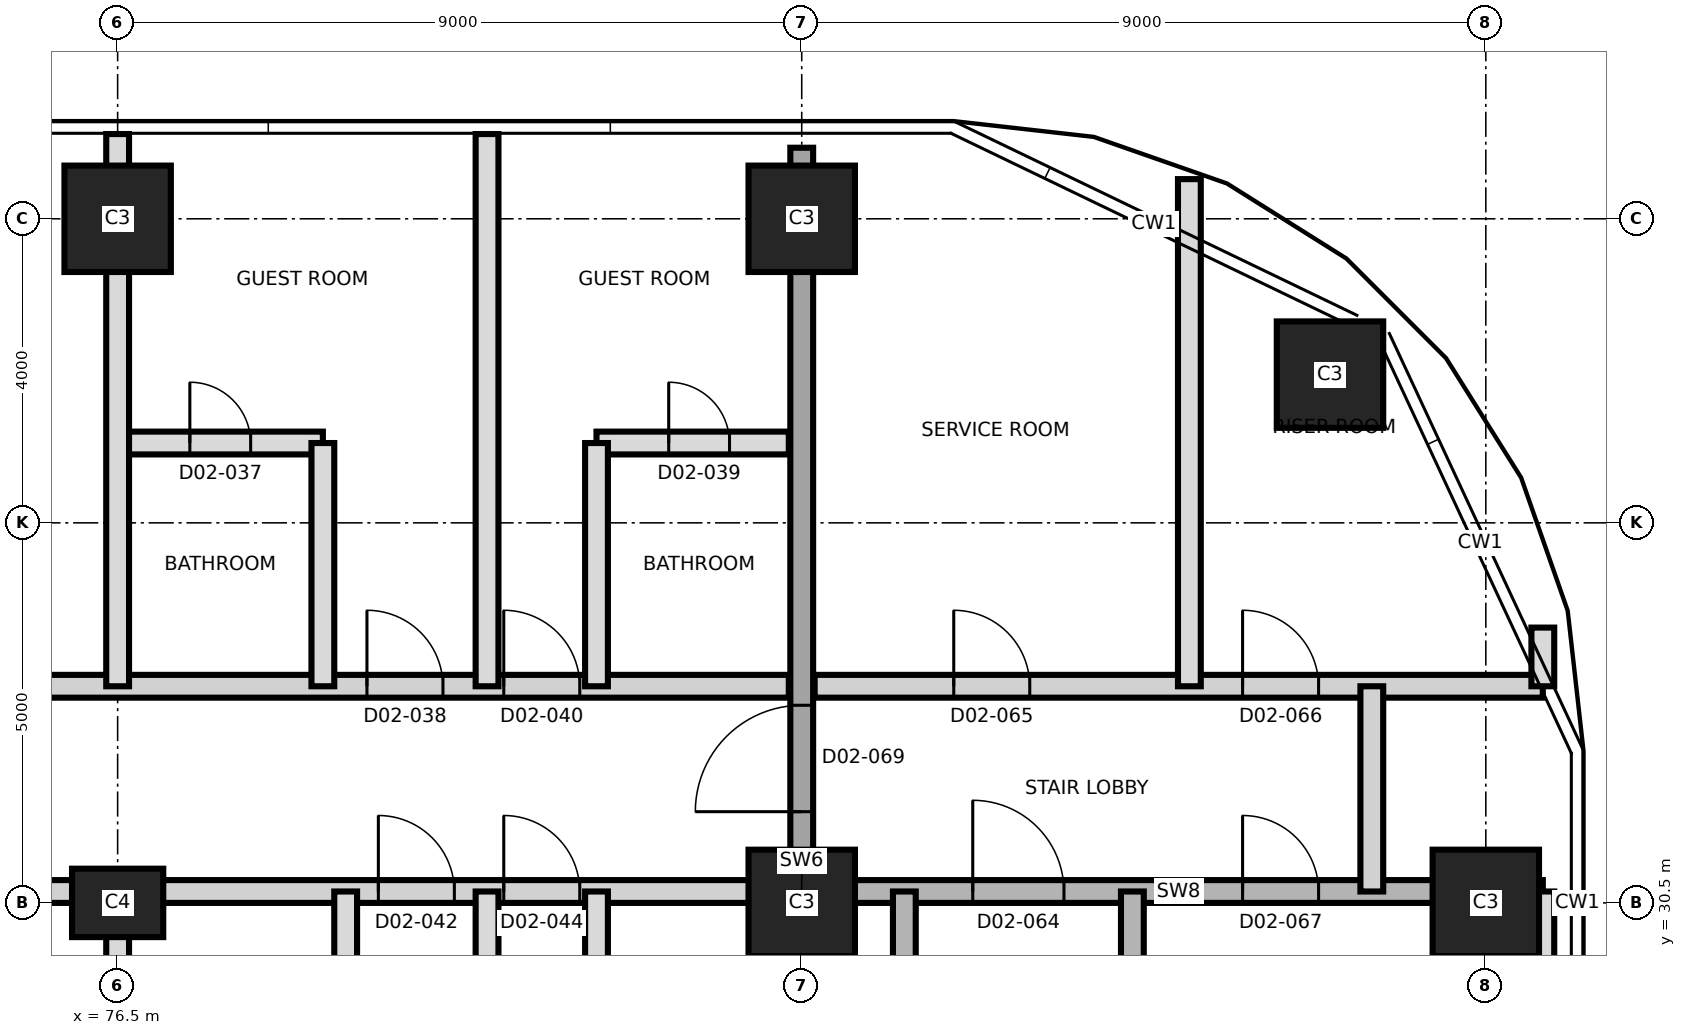
"""IFC4 building model, lengths in metres.
Left out: names, types, materials, properties, quantities, classifications, styles, units other than length and angle.
Written with IfcOpenShell. Run it as: python <this file> out.ifc"""

import sys

from ifc_helpers import new_model, si_unit, direction, frame, frame_2d, origin, origin_2d, place, context, subcontext, project, spatial, rectangle, extrude, element, fill, save


model = new_model("IFC4")
c1 = context("Model", 3, precision=1e-05, world=origin(), true_north=direction((0.0, 1.0)))
c2 = subcontext(c1, "Body", "Model", "MODEL_VIEW")
j1 = project(units=[si_unit("LENGTHUNIT", "METRE"), si_unit("PLANEANGLEUNIT", "RADIAN")], contexts=[c1])
p1 = place(None, origin())
s1 = spatial("IfcSite", under=j1, at=p1, CompositionType="ELEMENT")
p2 = place(p1, origin())
s2 = spatial("IfcBuilding", under=s1, at=p2, CompositionType="ELEMENT")
p3 = place(p2, frame((0.0, 0.0, 44.6)))
s3 = spatial("IfcBuildingStorey", under=s2, at=p3, CompositionType="ELEMENT", Elevation=44.6)
p4 = place(p3, frame((76.5, 30.5, 0.0), z_axis=(0.0, 0.0, 1.0), x_axis=(1.0, 0.0, 0.0)))
e1 = element("IfcColumn", 1, at=p4, inside=s3, PredefinedType="COLUMN", context=c2, shape_type="SweptSolid", body=[
    extrude(rectangle(XDim=1.2, YDim=0.9, at=origin_2d()), origin(), (0.0, 0.0, 1.0), 3.7),
])
for number, where, z_axis, x_axis in (
    (2, (85.5, 30.5, 0.0), (0.0, 0.0, 1.0), (1.0, 0.0, 0.0)),
    (3, (94.5, 30.5, 0.0), (0.0, 0.0, 1.0), (1.0, 0.0, 0.0)),
    (4, (92.45, 37.45, 0.0), (0.0, 0.0, 1.0), (1.0, 0.0, 0.0)),
    (5, (76.5, 39.5, 0.0), (0.0, 0.0, 1.0), (1.0, 0.0, 0.0)),
    (6, (85.5, 39.5, 0.0), (0.0, 0.0, 1.0), (1.0, 0.0, 0.0)),
):
    element("IfcColumn", number, at=place(p3, frame(where, z_axis=z_axis, x_axis=x_axis)), inside=s3, PredefinedType="COLUMN", context=c2, shape_type="SweptSolid", body=[
        extrude(rectangle(XDim=1.4, YDim=1.4, at=origin_2d()), origin(), (0.0, 0.0, 1.0), 3.7),
    ])
p5 = place(p3, frame((85.5, 20.565, 0.0), z_axis=(0.0, 0.0, 1.0), x_axis=(0.0, 1.0, 0.0)))
e7 = element("IfcWall", 7, at=p5, inside=s3, PredefinedType="SHEAR", context=c2, shape_type="SweptSolid", body=[
    extrude(rectangle(XDim=19.87, YDim=0.3, at=frame_2d((9.935, 0.0))), origin(), (0.0, 0.0, 1.0), 3.7),
])
p6 = place(p5, frame((11.135, 0.0, 0.0)))
e8 = element("IfcOpeningElement", 8, at=p6, cuts=e7, PredefinedType="OPENING", context=c2, shape_type="SweptSolid", body=[
    extrude(rectangle(XDim=1.4, YDim=2.1, at=frame_2d((0.7, 1.05))), frame((0.0, 0.16, 0.0), z_axis=(0.0, -1.0, 0.0), x_axis=(1.0, 0.0, 0.0)), (0.0, 0.0, 1.0), 0.32),
])
p7 = place(p3, frame((58.95, 30.65, 0.0), z_axis=(0.0, 0.0, 1.0), x_axis=(1.0, 0.0, 0.0)))
e9 = element("IfcWall", 9, at=p7, inside=s3, PredefinedType="PARTITIONING", context=c2, shape_type="SweptSolid", body=[
    extrude(rectangle(XDim=26.38, YDim=0.3, at=frame_2d((13.19, 0.0))), origin(), (0.0, 0.0, 1.0), 3.4),
])
p8 = place(p7, frame((0.685, 0.0, 0.0)))
e10 = element("IfcOpeningElement", 10, at=p8, cuts=e9, PredefinedType="OPENING", context=c2, shape_type="SweptSolid", body=[
    extrude(rectangle(XDim=1.2, YDim=2.1, at=frame_2d((0.6, 1.05))), frame((0.0, 0.16, 0.0), z_axis=(0.0, -1.0, 0.0), x_axis=(1.0, 0.0, 0.0)), (0.0, 0.0, 1.0), 0.32),
])
p9 = place(p7, frame((3.935, 0.0, 0.0)))
e11 = element("IfcOpeningElement", 11, at=p9, cuts=e9, PredefinedType="OPENING", context=c2, shape_type="SweptSolid", body=[
    extrude(rectangle(XDim=1.0, YDim=2.1, at=frame_2d((0.5, 1.05))), frame((0.0, 0.16, 0.0), z_axis=(0.0, -1.0, 0.0), x_axis=(1.0, 0.0, 0.0)), (0.0, 0.0, 1.0), 0.32),
])
p10 = place(p7, frame((12.55, 0.0, 0.0)))
e12 = element("IfcOpeningElement", 12, at=p10, cuts=e9, PredefinedType="OPENING", context=c2, shape_type="SweptSolid", body=[
    extrude(rectangle(XDim=1.0, YDim=2.4, at=frame_2d((0.5, 1.2))), frame((0.0, 0.16, 0.0), z_axis=(0.0, -1.0, 0.0), x_axis=(1.0, 0.0, 0.0)), (0.0, 0.0, 1.0), 0.32),
])
p11 = place(p7, frame((20.98, 0.0, 0.0)))
e13 = element("IfcOpeningElement", 13, at=p11, cuts=e9, PredefinedType="OPENING", context=c2, shape_type="SweptSolid", body=[
    extrude(rectangle(XDim=1.0, YDim=2.4, at=frame_2d((0.5, 1.2))), frame((0.0, 0.16, 0.0), z_axis=(0.0, -1.0, 0.0), x_axis=(1.0, 0.0, 0.0)), (0.0, 0.0, 1.0), 0.32),
])
p12 = place(p7, frame((22.63, 0.0, 0.0)))
e14 = element("IfcOpeningElement", 14, at=p12, cuts=e9, PredefinedType="OPENING", context=c2, shape_type="SweptSolid", body=[
    extrude(rectangle(XDim=1.0, YDim=2.4, at=frame_2d((0.5, 1.2))), frame((0.0, 0.16, 0.0), z_axis=(0.0, -1.0, 0.0), x_axis=(1.0, 0.0, 0.0)), (0.0, 0.0, 1.0), 0.32),
])
p13 = place(p3, frame((85.67, 30.65, 0.0), z_axis=(0.0, 0.0, 1.0), x_axis=(1.0, 0.0, 0.0)))
e15 = element("IfcWall", 15, at=p13, inside=s3, PredefinedType="SHEAR", context=c2, shape_type="SweptSolid", body=[
    extrude(rectangle(XDim=9.58, YDim=0.3, at=frame_2d((4.79, 0.0))), origin(), (0.0, 0.0, 1.0), 3.4),
])
p14 = place(p13, frame((2.08, 0.0, 0.0)))
e16 = element("IfcOpeningElement", 16, at=p14, cuts=e15, PredefinedType="OPENING", context=c2, shape_type="SweptSolid", body=[
    extrude(rectangle(XDim=1.2, YDim=2.1, at=frame_2d((0.6, 1.05))), frame((0.0, 0.16, 0.0), z_axis=(0.0, -1.0, 0.0), x_axis=(1.0, 0.0, 0.0)), (0.0, 0.0, 1.0), 0.32),
])
p15 = place(p13, frame((5.63, 0.0, 0.0)))
e17 = element("IfcOpeningElement", 17, at=p15, cuts=e15, PredefinedType="OPENING", context=c2, shape_type="SweptSolid", body=[
    extrude(rectangle(XDim=1.0, YDim=2.1, at=frame_2d((0.5, 1.05))), frame((0.0, 0.16, 0.0), z_axis=(0.0, -1.0, 0.0), x_axis=(1.0, 0.0, 0.0)), (0.0, 0.0, 1.0), 0.32),
])
p16 = place(p3, frame((58.95, 33.35, 0.0), z_axis=(0.0, 0.0, 1.0), x_axis=(1.0, 0.0, 0.0)))
e18 = element("IfcWall", 18, at=p16, inside=s3, PredefinedType="PARTITIONING", context=c2, shape_type="SweptSolid", body=[
    extrude(rectangle(XDim=26.38, YDim=0.3, at=frame_2d((13.19, 0.0))), origin(), (0.0, 0.0, 1.0), 3.4),
])
p17 = place(p16, frame((2.6, 0.0, 0.0)))
e19 = element("IfcOpeningElement", 19, at=p17, cuts=e18, PredefinedType="OPENING", context=c2, shape_type="SweptSolid", body=[
    extrude(rectangle(XDim=1.0, YDim=2.1, at=frame_2d((0.5, 1.05))), frame((0.0, 0.16, 0.0), z_axis=(0.0, -1.0, 0.0), x_axis=(1.0, 0.0, 0.0)), (0.0, 0.0, 1.0), 0.32),
])
p18 = place(p16, frame((5.55, 0.0, 0.0)))
e20 = element("IfcOpeningElement", 20, at=p18, cuts=e18, PredefinedType="OPENING", context=c2, shape_type="SweptSolid", body=[
    extrude(rectangle(XDim=1.4, YDim=2.1, at=frame_2d((0.7, 1.05))), frame((0.0, 0.16, 0.0), z_axis=(0.0, -1.0, 0.0), x_axis=(1.0, 0.0, 0.0)), (0.0, 0.0, 1.0), 0.32),
])
p19 = place(p16, frame((14.2, 0.0, 0.0)))
e21 = element("IfcOpeningElement", 21, at=p19, cuts=e18, PredefinedType="OPENING", context=c2, shape_type="SweptSolid", body=[
    extrude(rectangle(XDim=1.0, YDim=2.4, at=frame_2d((0.5, 1.2))), frame((0.0, 0.16, 0.0), z_axis=(0.0, -1.0, 0.0), x_axis=(1.0, 0.0, 0.0)), (0.0, 0.0, 1.0), 0.32),
])
p20 = place(p16, frame((20.83, 0.0, 0.0)))
e22 = element("IfcOpeningElement", 22, at=p20, cuts=e18, PredefinedType="OPENING", context=c2, shape_type="SweptSolid", body=[
    extrude(rectangle(XDim=1.0, YDim=2.1, at=frame_2d((0.5, 1.05))), frame((0.0, 0.16, 0.0), z_axis=(0.0, -1.0, 0.0), x_axis=(1.0, 0.0, 0.0)), (0.0, 0.0, 1.0), 0.32),
])
p21 = place(p16, frame((22.63, 0.0, 0.0)))
e23 = element("IfcOpeningElement", 23, at=p21, cuts=e18, PredefinedType="OPENING", context=c2, shape_type="SweptSolid", body=[
    extrude(rectangle(XDim=1.0, YDim=2.1, at=frame_2d((0.5, 1.05))), frame((0.0, 0.16, 0.0), z_axis=(0.0, -1.0, 0.0), x_axis=(1.0, 0.0, 0.0)), (0.0, 0.0, 1.0), 0.32),
])
p22 = place(p3, frame((85.67, 33.35, 0.0), z_axis=(0.0, 0.0, 1.0), x_axis=(1.0, 0.0, 0.0)))
e24 = element("IfcWall", 24, at=p22, inside=s3, PredefinedType="PARTITIONING", context=c2, shape_type="SweptSolid", body=[
    extrude(rectangle(XDim=9.58, YDim=0.3, at=frame_2d((4.79, 0.0))), origin(), (0.0, 0.0, 1.0), 3.4),
])
p23 = place(p22, frame((1.83, 0.0, 0.0)))
e25 = element("IfcOpeningElement", 25, at=p23, cuts=e24, PredefinedType="OPENING", context=c2, shape_type="SweptSolid", body=[
    extrude(rectangle(XDim=1.0, YDim=2.1, at=frame_2d((0.5, 1.05))), frame((0.0, 0.16, 0.0), z_axis=(0.0, -1.0, 0.0), x_axis=(1.0, 0.0, 0.0)), (0.0, 0.0, 1.0), 0.32),
])
p24 = place(p22, frame((5.63, 0.0, 0.0)))
e26 = element("IfcOpeningElement", 26, at=p24, cuts=e24, PredefinedType="OPENING", context=c2, shape_type="SweptSolid", body=[
    extrude(rectangle(XDim=1.0, YDim=2.1, at=frame_2d((0.5, 1.05))), frame((0.0, 0.16, 0.0), z_axis=(0.0, -1.0, 0.0), x_axis=(1.0, 0.0, 0.0)), (0.0, 0.0, 1.0), 0.32),
])
p25 = place(p3, frame((76.5, 36.55, 0.0), z_axis=(0.0, 0.0, 1.0), x_axis=(1.0, 0.0, 0.0)))
e27 = element("IfcWall", 27, at=p25, inside=s3, PredefinedType="PARTITIONING", context=c2, shape_type="SweptSolid", body=[
    extrude(rectangle(XDim=2.7, YDim=0.3, at=frame_2d((1.35, 0.0))), origin(), (0.0, 0.0, 1.0), 3.4),
])
p26 = place(p25, frame((0.95, 0.0, 0.0)))
e28 = element("IfcOpeningElement", 28, at=p26, cuts=e27, PredefinedType="OPENING", context=c2, shape_type="SweptSolid", body=[
    extrude(rectangle(XDim=0.8, YDim=2.1, at=frame_2d((0.4, 1.05))), frame((0.0, 0.16, 0.0), z_axis=(0.0, -1.0, 0.0), x_axis=(1.0, 0.0, 0.0)), (0.0, 0.0, 1.0), 0.32),
])
p27 = place(p3, frame((82.8, 36.55, 0.0), z_axis=(0.0, 0.0, 1.0), x_axis=(1.0, 0.0, 0.0)))
e29 = element("IfcWall", 29, at=p27, inside=s3, PredefinedType="PARTITIONING", context=c2, shape_type="SweptSolid", body=[
    extrude(rectangle(XDim=2.53, YDim=0.3, at=frame_2d((1.265, 0.0))), origin(), (0.0, 0.0, 1.0), 3.4),
])
p28 = place(p27, frame((0.95, 0.0, 0.0)))
e30 = element("IfcOpeningElement", 30, at=p28, cuts=e29, PredefinedType="OPENING", context=c2, shape_type="SweptSolid", body=[
    extrude(rectangle(XDim=0.8, YDim=2.1, at=frame_2d((0.4, 1.05))), frame((0.0, 0.16, 0.0), z_axis=(0.0, -1.0, 0.0), x_axis=(1.0, 0.0, 0.0)), (0.0, 0.0, 1.0), 0.32),
])
p29 = place(p3, frame((76.5, 20.565, 0.0), z_axis=(0.0, 0.0, 1.0), x_axis=(0.0, 1.0, 0.0)))
e31 = element("IfcWall", 31, at=p29, inside=s3, PredefinedType="PARTITIONING", context=c2, shape_type="SweptSolid", body=[
    extrude(rectangle(XDim=10.085, YDim=0.3, at=frame_2d((5.042, 0.0))), origin(), (0.0, 0.0, 1.0), 3.4),
])
p30 = place(p3, frame((76.5, 33.35, 0.0), z_axis=(0.0, 0.0, 1.0), x_axis=(0.0, 1.0, 0.0)))
e32 = element("IfcWall", 32, at=p30, inside=s3, PredefinedType="PARTITIONING", context=c2, shape_type="SweptSolid", body=[
    extrude(rectangle(XDim=7.265, YDim=0.3, at=frame_2d((3.632, 0.0))), origin(), (0.0, 0.0, 1.0), 3.4),
])
p31 = place(p3, frame((79.2, 33.35, 0.0), z_axis=(0.0, 0.0, 1.0), x_axis=(0.0, 1.0, 0.0)))
e33 = element("IfcWall", 33, at=p31, inside=s3, PredefinedType="PARTITIONING", context=c2, shape_type="SweptSolid", body=[
    extrude(rectangle(XDim=3.2, YDim=0.3, at=frame_2d((1.6, 0.0))), origin(), (0.0, 0.0, 1.0), 3.4),
])
p32 = place(p3, frame((79.5, 27.35, 0.0), z_axis=(0.0, 0.0, 1.0), x_axis=(0.0, 1.0, 0.0)))
e34 = element("IfcWall", 34, at=p32, inside=s3, PredefinedType="PARTITIONING", context=c2, shape_type="SweptSolid", body=[
    extrude(rectangle(XDim=3.3, YDim=0.3, at=frame_2d((1.65, 0.0))), origin(), (0.0, 0.0, 1.0), 3.4),
])
p33 = place(p3, frame((81.36, 20.565, 0.0), z_axis=(0.0, 0.0, 1.0), x_axis=(0.0, 1.0, 0.0)))
e35 = element("IfcWall", 35, at=p33, inside=s3, PredefinedType="PARTITIONING", context=c2, shape_type="SweptSolid", body=[
    extrude(rectangle(XDim=10.085, YDim=0.3, at=frame_2d((5.042, 0.0))), origin(), (0.0, 0.0, 1.0), 3.4),
])
p34 = place(p3, frame((81.36, 33.35, 0.0), z_axis=(0.0, 0.0, 1.0), x_axis=(0.0, 1.0, 0.0)))
e36 = element("IfcWall", 36, at=p34, inside=s3, PredefinedType="PARTITIONING", context=c2, shape_type="SweptSolid", body=[
    extrude(rectangle(XDim=7.265, YDim=0.3, at=frame_2d((3.632, 0.0))), origin(), (0.0, 0.0, 1.0), 3.4),
])
p35 = place(p3, frame((82.8, 27.35, 0.0), z_axis=(0.0, 0.0, 1.0), x_axis=(0.0, 1.0, 0.0)))
e37 = element("IfcWall", 37, at=p35, inside=s3, PredefinedType="PARTITIONING", context=c2, shape_type="SweptSolid", body=[
    extrude(rectangle(XDim=3.3, YDim=0.3, at=frame_2d((1.65, 0.0))), origin(), (0.0, 0.0, 1.0), 3.4),
])
p36 = place(p3, frame((82.8, 33.35, 0.0), z_axis=(0.0, 0.0, 1.0), x_axis=(0.0, 1.0, 0.0)))
e38 = element("IfcWall", 38, at=p36, inside=s3, PredefinedType="PARTITIONING", context=c2, shape_type="SweptSolid", body=[
    extrude(rectangle(XDim=3.2, YDim=0.3, at=frame_2d((1.6, 0.0))), origin(), (0.0, 0.0, 1.0), 3.4),
])
for number, where, z_axis, x_axis in (
    (39, (86.85, 21.8, 0.0), (0.0, 0.0, 1.0), (0.0, 1.0, 0.0)),
    (40, (89.85, 21.8, 0.0), (0.0, 0.0, 1.0), (0.0, 1.0, 0.0)),
):
    element("IfcWall", number, at=place(p3, frame(where, z_axis=z_axis, x_axis=x_axis)), inside=s3, PredefinedType="SHEAR", context=c2, shape_type="SweptSolid", body=[
        extrude(rectangle(XDim=8.85, YDim=0.3, at=frame_2d((4.425, 0.0))), origin(), (0.0, 0.0, 1.0), 3.4),
    ])
p37 = place(p3, frame((90.6, 33.35, 0.0), z_axis=(0.0, 0.0, 1.0), x_axis=(0.0, 1.0, 0.0)))
e41 = element("IfcWall", 41, at=p37, inside=s3, PredefinedType="PARTITIONING", context=c2, shape_type="SweptSolid", body=[
    extrude(rectangle(XDim=6.672, YDim=0.3, at=frame_2d((3.336, 0.0))), origin(), (0.0, 0.0, 1.0), 3.4),
])
p38 = place(p3, frame((93.0, 30.65, 0.0), z_axis=(0.0, 0.0, 1.0), x_axis=(0.0, 1.0, 0.0)))
e42 = element("IfcWall", 42, at=p38, inside=s3, PredefinedType="PARTITIONING", context=c2, shape_type="SweptSolid", body=[
    extrude(rectangle(XDim=2.7, YDim=0.3, at=frame_2d((1.35, 0.0))), origin(), (0.0, 0.0, 1.0), 3.4),
])
p39 = place(p3, frame((95.25, 26.034, 0.0), z_axis=(0.0, 0.0, 1.0), x_axis=(0.0, 1.0, 0.0)))
e43 = element("IfcWall", 43, at=p39, inside=s3, PredefinedType="PARTITIONING", context=c2, shape_type="SweptSolid", body=[
    extrude(rectangle(XDim=4.616, YDim=0.3, at=frame_2d((2.308, 0.0))), origin(), (0.0, 0.0, 1.0), 3.4),
])
p40 = place(p3, frame((95.25, 33.35, 0.0), z_axis=(0.0, 0.0, 1.0), x_axis=(0.0, 1.0, 0.0)))
e44 = element("IfcWall", 44, at=p40, inside=s3, PredefinedType="PARTITIONING", context=c2, shape_type="SweptSolid", body=[
    extrude(rectangle(XDim=0.772, YDim=0.3, at=frame_2d((0.386, 0.0))), origin(), (0.0, 0.0, 1.0), 3.4),
])
p41 = place(p26, origin())
e45 = element("IfcDoor", 45, at=p41, inside=s3, OperationType="SINGLE_SWING_LEFT", PredefinedType="DOOR", context=c2, shape_type="SweptSolid", body=[
    extrude(rectangle(XDim=0.8, YDim=2.1, at=frame_2d((0.4, 1.05))), frame((0.0, 0.025, 0.0), z_axis=(0.0, -1.0, 0.0), x_axis=(1.0, 0.0, 0.0)), (0.0, 0.0, 1.0), 0.05),
])
fill(e28, e45)
p42 = place(p20, origin())
e46 = element("IfcDoor", 46, at=p42, inside=s3, OperationType="SINGLE_SWING_RIGHT", PredefinedType="DOOR", context=c2, shape_type="SweptSolid", body=[
    extrude(rectangle(XDim=1.0, YDim=2.1, at=frame_2d((0.5, 1.05))), frame((0.0, 0.025, 0.0), z_axis=(0.0, -1.0, 0.0), x_axis=(1.0, 0.0, 0.0)), (0.0, 0.0, 1.0), 0.05),
])
fill(e22, e46)
p43 = place(p28, origin())
e47 = element("IfcDoor", 47, at=p43, inside=s3, OperationType="SINGLE_SWING_RIGHT", PredefinedType="DOOR", context=c2, shape_type="SweptSolid", body=[
    extrude(rectangle(XDim=0.8, YDim=2.1, at=frame_2d((0.4, 1.05))), frame((0.0, 0.025, 0.0), z_axis=(0.0, -1.0, 0.0), x_axis=(1.0, 0.0, 0.0)), (0.0, 0.0, 1.0), 0.05),
])
fill(e30, e47)
p44 = place(p21, origin())
e48 = element("IfcDoor", 48, at=p44, inside=s3, OperationType="SINGLE_SWING_LEFT", PredefinedType="DOOR", context=c2, shape_type="SweptSolid", body=[
    extrude(rectangle(XDim=1.0, YDim=2.1, at=frame_2d((0.5, 1.05))), frame((0.0, 0.025, 0.0), z_axis=(0.0, -1.0, 0.0), x_axis=(1.0, 0.0, 0.0)), (0.0, 0.0, 1.0), 0.05),
])
fill(e23, e48)
p45 = place(p11, origin())
e49 = element("IfcDoor", 49, at=p45, inside=s3, OperationType="SINGLE_SWING_LEFT", PredefinedType="DOOR", context=c2, shape_type="SweptSolid", body=[
    extrude(rectangle(XDim=1.0, YDim=2.4, at=frame_2d((0.5, 1.2))), frame((0.0, 0.025, 0.0), z_axis=(0.0, -1.0, 0.0), x_axis=(1.0, 0.0, 0.0)), (0.0, 0.0, 1.0), 0.05),
])
fill(e13, e49)
p46 = place(p12, origin())
e50 = element("IfcDoor", 50, at=p46, inside=s3, OperationType="SINGLE_SWING_RIGHT", PredefinedType="DOOR", context=c2, shape_type="SweptSolid", body=[
    extrude(rectangle(XDim=1.0, YDim=2.4, at=frame_2d((0.5, 1.2))), frame((0.0, 0.025, 0.0), z_axis=(0.0, -1.0, 0.0), x_axis=(1.0, 0.0, 0.0)), (0.0, 0.0, 1.0), 0.05),
])
fill(e14, e50)
p47 = place(p14, origin())
e51 = element("IfcDoor", 51, at=p47, inside=s3, OperationType="SINGLE_SWING_LEFT", PredefinedType="DOOR", context=c2, shape_type="SweptSolid", body=[
    extrude(rectangle(XDim=1.2, YDim=2.1, at=frame_2d((0.6, 1.05))), frame((0.0, 0.025, 0.0), z_axis=(0.0, -1.0, 0.0), x_axis=(1.0, 0.0, 0.0)), (0.0, 0.0, 1.0), 0.05),
])
fill(e16, e51)
p48 = place(p23, origin())
e52 = element("IfcDoor", 52, at=p48, inside=s3, OperationType="SINGLE_SWING_LEFT", PredefinedType="DOOR", context=c2, shape_type="SweptSolid", body=[
    extrude(rectangle(XDim=1.0, YDim=2.1, at=frame_2d((0.5, 1.05))), frame((0.0, 0.025, 0.0), z_axis=(0.0, -1.0, 0.0), x_axis=(1.0, 0.0, 0.0)), (0.0, 0.0, 1.0), 0.05),
])
fill(e25, e52)
p49 = place(p24, origin())
e53 = element("IfcDoor", 53, at=p49, inside=s3, OperationType="SINGLE_SWING_RIGHT", PredefinedType="DOOR", context=c2, shape_type="SweptSolid", body=[
    extrude(rectangle(XDim=1.0, YDim=2.1, at=frame_2d((0.5, 1.05))), frame((0.0, 0.025, 0.0), z_axis=(0.0, -1.0, 0.0), x_axis=(1.0, 0.0, 0.0)), (0.0, 0.0, 1.0), 0.05),
])
fill(e26, e53)
p50 = place(p15, origin())
e54 = element("IfcDoor", 54, at=p50, inside=s3, OperationType="SINGLE_SWING_LEFT", PredefinedType="DOOR", context=c2, shape_type="SweptSolid", body=[
    extrude(rectangle(XDim=1.0, YDim=2.1, at=frame_2d((0.5, 1.05))), frame((0.0, 0.025, 0.0), z_axis=(0.0, -1.0, 0.0), x_axis=(1.0, 0.0, 0.0)), (0.0, 0.0, 1.0), 0.05),
])
fill(e17, e54)
p51 = place(p6, origin())
e55 = element("IfcDoor", 55, at=p51, inside=s3, OperationType="SINGLE_SWING_RIGHT", PredefinedType="DOOR", context=c2, shape_type="SweptSolid", body=[
    extrude(rectangle(XDim=1.4, YDim=2.1, at=frame_2d((0.7, 1.05))), frame((0.0, 0.025, 0.0), z_axis=(0.0, -1.0, 0.0), x_axis=(1.0, 0.0, 0.0)), (0.0, 0.0, 1.0), 0.05),
])
fill(e8, e55)
save(model, sys.argv[1])
